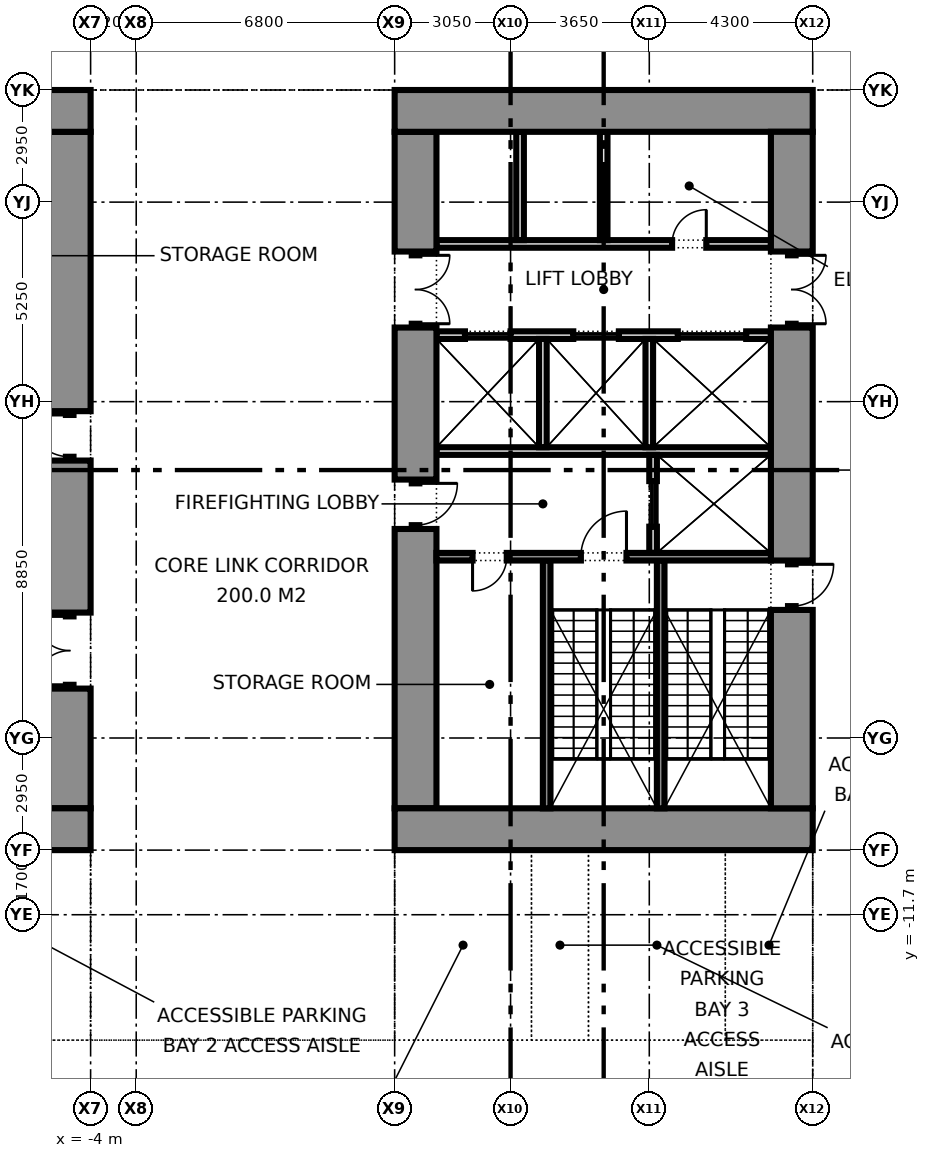
"""IFC4 building model, lengths in metres.
Left out: names, types, materials, properties, quantities, classifications, styles, units other than length and angle.
Written with IfcOpenShell. Run it as: python <this file> out.ifc"""

import sys

from ifc_helpers import new_model, si_unit, direction, frame, frame_2d, origin, place, context, subcontext, project, spatial, rectangle, extrude, element, fill, save


model = new_model("IFC4")
c1 = context("Model", 3, precision=1e-05, world=origin(), true_north=direction((0.0, 1.0)))
c2 = subcontext(c1, "Body", "Model", "MODEL_VIEW")
j1 = project(units=[si_unit("LENGTHUNIT", "METRE"), si_unit("PLANEANGLEUNIT", "RADIAN")], contexts=[c1])
p1 = place(None, origin())
s1 = spatial("IfcSite", under=j1, at=p1, CompositionType="ELEMENT")
p2 = place(p1, origin())
s2 = spatial("IfcBuilding", under=s1, at=p2, CompositionType="ELEMENT")
p3 = place(p2, frame((0.0, 0.0, -5.0)))
s3 = spatial("IfcBuildingStorey", under=s2, at=p3, CompositionType="ELEMENT", Elevation=-5.0)
for number, where, z_axis, x_axis in (
    (1, (-15.0, -9.45, 0.0), (0.0, 0.0, 1.0), (1.0, 0.0, 0.0)),
    (2, (-15.0, 9.45, 0.0), (0.0, 0.0, 1.0), (1.0, 0.0, 0.0)),
):
    element("IfcWall", number, at=place(p3, frame(where, z_axis=z_axis, x_axis=x_axis)), inside=s3, PredefinedType="SHEAR", context=c2, shape_type="SweptSolid", body=[
        extrude(rectangle(XDim=11.0, YDim=1.1, at=frame_2d((5.5, 0.0))), origin(), (0.0, 0.0, 1.0), 4.7),
    ])
p4 = place(p3, frame((-4.55, -8.9, 0.0), z_axis=(0.0, 0.0, 1.0), x_axis=(0.0, 1.0, 0.0)))
e3 = element("IfcWall", 3, at=p4, inside=s3, PredefinedType="SHEAR", context=c2, shape_type="SweptSolid", body=[
    extrude(rectangle(XDim=3.15, YDim=1.1, at=frame_2d((1.575, 0.0))), origin(), (0.0, 0.0, 1.0), 4.7),
])
p5 = place(p3, frame((-4.55, -5.75, 0.0), z_axis=(0.0, 0.0, 1.0), x_axis=(0.0, 1.0, 0.0)))
e4 = element("IfcWall", 4, at=p5, inside=s3, PredefinedType="PARTITIONING", context=c2, shape_type="SweptSolid", body=[
    extrude(rectangle(XDim=2.0, YDim=0.2, at=frame_2d((1.0, 0.0))), origin(), (0.0, 0.0, 1.0), 2.4),
])
p6 = place(p5, frame((0.1, 0.0, 0.0)))
e5 = element("IfcOpeningElement", 5, at=p6, cuts=e4, PredefinedType="OPENING", context=c2, shape_type="SweptSolid", body=[
    extrude(rectangle(XDim=1.8, YDim=2.1, at=frame_2d((0.9, 1.05))), frame((0.0, 0.11, 0.0), z_axis=(0.0, -1.0, 0.0), x_axis=(1.0, 0.0, 0.0)), (0.0, 0.0, 1.0), 0.22),
])
p7 = place(p3, frame((-4.55, -3.75, 0.0), z_axis=(0.0, 0.0, 1.0), x_axis=(0.0, 1.0, 0.0)))
e6 = element("IfcWall", 6, at=p7, inside=s3, PredefinedType="SHEAR", context=c2, shape_type="SweptSolid", body=[
    extrude(rectangle(XDim=4.0, YDim=1.1, at=frame_2d((2.0, 0.0))), origin(), (0.0, 0.0, 1.0), 4.7),
])
p8 = place(p3, frame((-4.55, 0.25, 0.0), z_axis=(0.0, 0.0, 1.0), x_axis=(0.0, 1.0, 0.0)))
e7 = element("IfcWall", 7, at=p8, inside=s3, PredefinedType="PARTITIONING", context=c2, shape_type="SweptSolid", body=[
    extrude(rectangle(XDim=1.3, YDim=0.2, at=frame_2d((0.65, 0.0))), origin(), (0.0, 0.0, 1.0), 2.4),
])
p9 = place(p8, frame((0.1, 0.0, 0.0)))
e8 = element("IfcOpeningElement", 8, at=p9, cuts=e7, PredefinedType="OPENING", context=c2, shape_type="SweptSolid", body=[
    extrude(rectangle(XDim=1.1, YDim=2.1, at=frame_2d((0.55, 1.05))), frame((0.0, 0.11, 0.0), z_axis=(0.0, -1.0, 0.0), x_axis=(1.0, 0.0, 0.0)), (0.0, 0.0, 1.0), 0.22),
])
p10 = place(p3, frame((-4.55, 1.55, 0.0), z_axis=(0.0, 0.0, 1.0), x_axis=(0.0, 1.0, 0.0)))
e9 = element("IfcWall", 9, at=p10, inside=s3, PredefinedType="SHEAR", context=c2, shape_type="SweptSolid", body=[
    extrude(rectangle(XDim=7.35, YDim=1.1, at=frame_2d((3.675, 0.0))), origin(), (0.0, 0.0, 1.0), 4.7),
])
for number, where, z_axis, x_axis in (
    (10, (15.0, 9.45, 0.0), (0.0, 0.0, 1.0), (-1.0, 0.0, 0.0)),
    (11, (15.0, -9.45, 0.0), (0.0, 0.0, 1.0), (-1.0, 0.0, 0.0)),
):
    element("IfcWall", number, at=place(p3, frame(where, z_axis=z_axis, x_axis=x_axis)), inside=s3, PredefinedType="SHEAR", context=c2, shape_type="SweptSolid", body=[
        extrude(rectangle(XDim=11.0, YDim=1.1, at=frame_2d((5.5, 0.0))), origin(), (0.0, 0.0, 1.0), 4.7),
    ])
p11 = place(p3, frame((14.45, 8.9, 0.0), z_axis=(0.0, 0.0, 1.0), x_axis=(0.0, -1.0, 0.0)))
e12 = element("IfcWall", 12, at=p11, inside=s3, PredefinedType="SHEAR", context=c2, shape_type="SweptSolid", body=[
    extrude(rectangle(XDim=3.15, YDim=1.1, at=frame_2d((1.575, 0.0))), origin(), (0.0, 0.0, 1.0), 4.7),
])
p12 = place(p3, frame((14.45, 5.75, 0.0), z_axis=(0.0, 0.0, 1.0), x_axis=(0.0, -1.0, 0.0)))
e13 = element("IfcWall", 13, at=p12, inside=s3, PredefinedType="PARTITIONING", context=c2, shape_type="SweptSolid", body=[
    extrude(rectangle(XDim=2.0, YDim=0.2, at=frame_2d((1.0, 0.0))), origin(), (0.0, 0.0, 1.0), 2.4),
])
p13 = place(p12, frame((0.1, 0.0, 0.0)))
e14 = element("IfcOpeningElement", 14, at=p13, cuts=e13, PredefinedType="OPENING", context=c2, shape_type="SweptSolid", body=[
    extrude(rectangle(XDim=1.8, YDim=2.1, at=frame_2d((0.9, 1.05))), frame((0.0, 0.11, 0.0), z_axis=(0.0, -1.0, 0.0), x_axis=(1.0, 0.0, 0.0)), (0.0, 0.0, 1.0), 0.22),
])
p14 = place(p3, frame((14.45, 3.75, 0.0), z_axis=(0.0, 0.0, 1.0), x_axis=(0.0, -1.0, 0.0)))
e15 = element("IfcWall", 15, at=p14, inside=s3, PredefinedType="SHEAR", context=c2, shape_type="SweptSolid", body=[
    extrude(rectangle(XDim=6.13, YDim=1.1, at=frame_2d((3.065, 0.0))), origin(), (0.0, 0.0, 1.0), 4.7),
])
p15 = place(p3, frame((14.45, -2.38, 0.0), z_axis=(0.0, 0.0, 1.0), x_axis=(0.0, -1.0, 0.0)))
e16 = element("IfcWall", 16, at=p15, inside=s3, PredefinedType="SHEAR", context=c2, shape_type="SweptSolid", body=[
    extrude(rectangle(XDim=1.3, YDim=0.2, at=frame_2d((0.65, 0.0))), origin(), (0.0, 0.0, 1.0), 2.4),
])
p16 = place(p15, frame((0.1, 0.0, 0.0)))
e17 = element("IfcOpeningElement", 17, at=p16, cuts=e16, PredefinedType="OPENING", context=c2, shape_type="SweptSolid", body=[
    extrude(rectangle(XDim=1.1, YDim=2.1, at=frame_2d((0.55, 1.05))), frame((0.0, 0.11, 0.0), z_axis=(0.0, -1.0, 0.0), x_axis=(1.0, 0.0, 0.0)), (0.0, 0.0, 1.0), 0.22),
])
p17 = place(p3, frame((14.45, -3.68, 0.0), z_axis=(0.0, 0.0, 1.0), x_axis=(0.0, -1.0, 0.0)))
e18 = element("IfcWall", 18, at=p17, inside=s3, PredefinedType="SHEAR", context=c2, shape_type="SweptSolid", body=[
    extrude(rectangle(XDim=5.22, YDim=1.1, at=frame_2d((2.61, 0.0))), origin(), (0.0, 0.0, 1.0), 4.7),
])
p18 = place(p3, frame((4.55, 8.9, 0.0), z_axis=(0.0, 0.0, 1.0), x_axis=(0.0, -1.0, 0.0)))
e19 = element("IfcWall", 19, at=p18, inside=s3, PredefinedType="SHEAR", context=c2, shape_type="SweptSolid", body=[
    extrude(rectangle(XDim=3.15, YDim=1.1, at=frame_2d((1.575, 0.0))), origin(), (0.0, 0.0, 1.0), 4.7),
])
p19 = place(p3, frame((4.55, 5.75, 0.0), z_axis=(0.0, 0.0, 1.0), x_axis=(0.0, -1.0, 0.0)))
e20 = element("IfcWall", 20, at=p19, inside=s3, PredefinedType="PARTITIONING", context=c2, shape_type="SweptSolid", body=[
    extrude(rectangle(XDim=2.0, YDim=0.2, at=frame_2d((1.0, 0.0))), origin(), (0.0, 0.0, 1.0), 2.4),
])
p20 = place(p19, frame((0.1, 0.0, 0.0)))
e21 = element("IfcOpeningElement", 21, at=p20, cuts=e20, PredefinedType="OPENING", context=c2, shape_type="SweptSolid", body=[
    extrude(rectangle(XDim=1.8, YDim=2.1, at=frame_2d((0.9, 1.05))), frame((0.0, 0.11, 0.0), z_axis=(0.0, -1.0, 0.0), x_axis=(1.0, 0.0, 0.0)), (0.0, 0.0, 1.0), 0.22),
])
p21 = place(p3, frame((4.55, 3.75, 0.0), z_axis=(0.0, 0.0, 1.0), x_axis=(0.0, -1.0, 0.0)))
e22 = element("IfcWall", 22, at=p21, inside=s3, PredefinedType="SHEAR", context=c2, shape_type="SweptSolid", body=[
    extrude(rectangle(XDim=4.0, YDim=1.1, at=frame_2d((2.0, 0.0))), origin(), (0.0, 0.0, 1.0), 4.7),
])
p22 = place(p3, frame((4.55, -0.25, 0.0), z_axis=(0.0, 0.0, 1.0), x_axis=(0.0, -1.0, 0.0)))
e23 = element("IfcWall", 23, at=p22, inside=s3, PredefinedType="PARTITIONING", context=c2, shape_type="SweptSolid", body=[
    extrude(rectangle(XDim=1.3, YDim=0.2, at=frame_2d((0.65, 0.0))), origin(), (0.0, 0.0, 1.0), 2.4),
])
p23 = place(p22, frame((0.1, 0.0, 0.0)))
e24 = element("IfcOpeningElement", 24, at=p23, cuts=e23, PredefinedType="OPENING", context=c2, shape_type="SweptSolid", body=[
    extrude(rectangle(XDim=1.1, YDim=2.1, at=frame_2d((0.55, 1.05))), frame((0.0, 0.11, 0.0), z_axis=(0.0, -1.0, 0.0), x_axis=(1.0, 0.0, 0.0)), (0.0, 0.0, 1.0), 0.22),
])
p24 = place(p3, frame((4.55, -1.55, 0.0), z_axis=(0.0, 0.0, 1.0), x_axis=(0.0, -1.0, 0.0)))
e25 = element("IfcWall", 25, at=p24, inside=s3, PredefinedType="SHEAR", context=c2, shape_type="SweptSolid", body=[
    extrude(rectangle(XDim=7.35, YDim=1.1, at=frame_2d((3.675, 0.0))), origin(), (0.0, 0.0, 1.0), 4.7),
])
p25 = place(p3, frame((13.9, 5.95, 0.0), z_axis=(0.0, 0.0, 1.0), x_axis=(-1.0, 0.0, 0.0)))
e26 = element("IfcWall", 26, at=p25, inside=s3, PredefinedType="PARTITIONING", context=c2, shape_type="SweptSolid", body=[
    extrude(rectangle(XDim=8.8, YDim=0.2, at=frame_2d((4.4, 0.0))), origin(), (0.0, 0.0, 1.0), 4.7),
])
p26 = place(p25, frame((1.7, 0.0, 0.0)))
e27 = element("IfcOpeningElement", 27, at=p26, cuts=e26, PredefinedType="OPENING", context=c2, shape_type="SweptSolid", body=[
    extrude(rectangle(XDim=0.9, YDim=2.1, at=frame_2d((0.45, 1.05))), frame((0.0, 0.11, 0.0), z_axis=(0.0, -1.0, 0.0), x_axis=(1.0, 0.0, 0.0)), (0.0, 0.0, 1.0), 0.22),
])
p27 = place(p3, frame((13.9, 3.55, 0.0), z_axis=(0.0, 0.0, 1.0), x_axis=(-1.0, 0.0, 0.0)))
e28 = element("IfcWall", 28, at=p27, inside=s3, PredefinedType="PARTITIONING", context=c2, shape_type="SweptSolid", body=[
    extrude(rectangle(XDim=8.8, YDim=0.2, at=frame_2d((4.4, 0.0))), origin(), (0.0, 0.0, 1.0), 4.7),
])
p28 = place(p27, frame((0.65, 0.0, 0.0)))
e29 = element("IfcOpeningElement", 29, at=p28, cuts=e28, PredefinedType="OPENING", context=c2, shape_type="SweptSolid", body=[
    extrude(rectangle(XDim=1.8, YDim=2.1, at=frame_2d((0.9, 1.05))), frame((0.0, 0.11, 0.0), z_axis=(0.0, -1.0, 0.0), x_axis=(1.0, 0.0, 0.0)), (0.0, 0.0, 1.0), 0.22),
])
p29 = place(p27, frame((4.0, 0.0, 0.0)))
e30 = element("IfcOpeningElement", 30, at=p29, cuts=e28, PredefinedType="OPENING", context=c2, shape_type="SweptSolid", body=[
    extrude(rectangle(XDim=1.2, YDim=2.1, at=frame_2d((0.6, 1.05))), frame((0.0, 0.11, 0.0), z_axis=(0.0, -1.0, 0.0), x_axis=(1.0, 0.0, 0.0)), (0.0, 0.0, 1.0), 0.22),
])
p30 = place(p27, frame((6.85, 0.0, 0.0)))
e31 = element("IfcOpeningElement", 31, at=p30, cuts=e28, PredefinedType="OPENING", context=c2, shape_type="SweptSolid", body=[
    extrude(rectangle(XDim=1.2, YDim=2.1, at=frame_2d((0.6, 1.05))), frame((0.0, 0.11, 0.0), z_axis=(0.0, -1.0, 0.0), x_axis=(1.0, 0.0, 0.0)), (0.0, 0.0, 1.0), 0.22),
])
p31 = place(p3, frame((13.9, 0.5, 0.0), z_axis=(0.0, 0.0, 1.0), x_axis=(-1.0, 0.0, 0.0)))
e32 = element("IfcWall", 32, at=p31, inside=s3, PredefinedType="PARTITIONING", context=c2, shape_type="SweptSolid", body=[
    extrude(rectangle(XDim=8.8, YDim=0.2, at=frame_2d((4.4, 0.0))), origin(), (0.0, 0.0, 1.0), 4.7),
])
p32 = place(p3, frame((10.8, 0.4, 0.0), z_axis=(0.0, 0.0, 1.0), x_axis=(0.0, -1.0, 0.0)))
e33 = element("IfcWall", 33, at=p32, inside=s3, PredefinedType="PARTITIONING", context=c2, shape_type="SweptSolid", body=[
    extrude(rectangle(XDim=2.58, YDim=0.2, at=frame_2d((1.29, 0.0))), origin(), (0.0, 0.0, 1.0), 4.7),
])
p33 = place(p32, frame((0.69, 0.0, 0.0)))
e34 = element("IfcOpeningElement", 34, at=p33, cuts=e33, PredefinedType="OPENING", context=c2, shape_type="SweptSolid", body=[
    extrude(rectangle(XDim=1.2, YDim=2.1, at=frame_2d((0.6, 1.05))), frame((0.0, 0.11, 0.0), z_axis=(0.0, -1.0, 0.0), x_axis=(1.0, 0.0, 0.0)), (0.0, 0.0, 1.0), 0.22),
])
p34 = place(p3, frame((13.9, -2.28, 0.0), z_axis=(0.0, 0.0, 1.0), x_axis=(-1.0, 0.0, 0.0)))
e35 = element("IfcWall", 35, at=p34, inside=s3, PredefinedType="SHEAR", context=c2, shape_type="SweptSolid", body=[
    extrude(rectangle(XDim=8.8, YDim=0.2, at=frame_2d((4.4, 0.0))), origin(), (0.0, 0.0, 1.0), 4.7),
])
p35 = place(p34, frame((3.8, 0.0, 0.0)))
e36 = element("IfcOpeningElement", 36, at=p35, cuts=e35, PredefinedType="OPENING", context=c2, shape_type="SweptSolid", body=[
    extrude(rectangle(XDim=1.2, YDim=2.1, at=frame_2d((0.6, 1.05))), frame((0.0, 0.11, 0.0), z_axis=(0.0, -1.0, 0.0), x_axis=(1.0, 0.0, 0.0)), (0.0, 0.0, 1.0), 0.22),
])
p36 = place(p34, frame((6.95, 0.0, 0.0)))
e37 = element("IfcOpeningElement", 37, at=p36, cuts=e35, PredefinedType="OPENING", context=c2, shape_type="SweptSolid", body=[
    extrude(rectangle(XDim=0.9, YDim=2.1, at=frame_2d((0.45, 1.05))), frame((0.0, 0.11, 0.0), z_axis=(0.0, -1.0, 0.0), x_axis=(1.0, 0.0, 0.0)), (0.0, 0.0, 1.0), 0.22),
])
for number, where, z_axis, x_axis in (
    (38, (11.0, -2.38, 0.0), (0.0, 0.0, 1.0), (0.0, -1.0, 0.0)),
    (39, (8.0, -2.38, 0.0), (0.0, 0.0, 1.0), (0.0, -1.0, 0.0)),
):
    element("IfcWall", number, at=place(p3, frame(where, z_axis=z_axis, x_axis=x_axis)), inside=s3, PredefinedType="SHEAR", context=c2, shape_type="SweptSolid", body=[
        extrude(rectangle(XDim=6.52, YDim=0.2, at=frame_2d((3.26, 0.0))), origin(), (0.0, 0.0, 1.0), 4.7),
    ])
for number, where, z_axis, x_axis in (
    (40, (9.5, 8.9, 0.0), (0.0, 0.0, 1.0), (0.0, -1.0, 0.0)),
    (41, (7.3, 8.9, 0.0), (0.0, 0.0, 1.0), (0.0, -1.0, 0.0)),
    (42, (10.7, 3.45, 0.0), (0.0, 0.0, 1.0), (0.0, -1.0, 0.0)),
    (43, (7.9, 3.45, 0.0), (0.0, 0.0, 1.0), (0.0, -1.0, 0.0)),
):
    element("IfcWall", number, at=place(p3, frame(where, z_axis=z_axis, x_axis=x_axis)), inside=s3, PredefinedType="PARTITIONING", context=c2, shape_type="SweptSolid", body=[
        extrude(rectangle(XDim=2.85, YDim=0.2, at=frame_2d((1.425, 0.0))), origin(), (0.0, 0.0, 1.0), 4.7),
    ])
p37 = place(p6, origin())
e44 = element("IfcDoor", 44, at=p37, inside=s3, OperationType="DOUBLE_DOOR_SINGLE_SWING", PredefinedType="DOOR", context=c2, shape_type="SweptSolid", body=[
    extrude(rectangle(XDim=1.8, YDim=2.1, at=frame_2d((0.9, 1.05))), frame((0.0, 0.025, 0.0), z_axis=(0.0, -1.0, 0.0), x_axis=(1.0, 0.0, 0.0)), (0.0, 0.0, 1.0), 0.05),
])
fill(e5, e44)
p38 = place(p9, origin())
e45 = element("IfcDoor", 45, at=p38, inside=s3, OperationType="SINGLE_SWING_RIGHT", PredefinedType="DOOR", context=c2, shape_type="SweptSolid", body=[
    extrude(rectangle(XDim=1.1, YDim=2.1, at=frame_2d((0.55, 1.05))), frame((0.0, 0.025, 0.0), z_axis=(0.0, -1.0, 0.0), x_axis=(1.0, 0.0, 0.0)), (0.0, 0.0, 1.0), 0.05),
])
fill(e8, e45)
p39 = place(p13, origin())
e46 = element("IfcDoor", 46, at=p39, inside=s3, OperationType="DOUBLE_DOOR_SINGLE_SWING", PredefinedType="DOOR", context=c2, shape_type="SweptSolid", body=[
    extrude(rectangle(XDim=1.8, YDim=2.1, at=frame_2d((0.9, 1.05))), frame((0.0, 0.025, 0.0), z_axis=(0.0, -1.0, 0.0), x_axis=(1.0, 0.0, 0.0)), (0.0, 0.0, 1.0), 0.05),
])
fill(e14, e46)
p40 = place(p16, origin())
e47 = element("IfcDoor", 47, at=p40, inside=s3, OperationType="SINGLE_SWING_LEFT", PredefinedType="DOOR", context=c2, shape_type="SweptSolid", body=[
    extrude(rectangle(XDim=1.1, YDim=2.1, at=frame_2d((0.55, 1.05))), frame((0.0, 0.025, 0.0), z_axis=(0.0, -1.0, 0.0), x_axis=(1.0, 0.0, 0.0)), (0.0, 0.0, 1.0), 0.05),
])
fill(e17, e47)
p41 = place(p20, origin())
e48 = element("IfcDoor", 48, at=p41, inside=s3, OperationType="DOUBLE_DOOR_SINGLE_SWING", PredefinedType="DOOR", context=c2, shape_type="SweptSolid", body=[
    extrude(rectangle(XDim=1.8, YDim=2.1, at=frame_2d((0.9, 1.05))), frame((0.0, 0.025, 0.0), z_axis=(0.0, -1.0, 0.0), x_axis=(1.0, 0.0, 0.0)), (0.0, 0.0, 1.0), 0.05),
])
fill(e21, e48)
p42 = place(p23, origin())
e49 = element("IfcDoor", 49, at=p42, inside=s3, OperationType="SINGLE_SWING_LEFT", PredefinedType="DOOR", context=c2, shape_type="SweptSolid", body=[
    extrude(rectangle(XDim=1.1, YDim=2.1, at=frame_2d((0.55, 1.05))), frame((0.0, 0.025, 0.0), z_axis=(0.0, -1.0, 0.0), x_axis=(1.0, 0.0, 0.0)), (0.0, 0.0, 1.0), 0.05),
])
fill(e24, e49)
p43 = place(p28, origin())
e50 = element("IfcDoor", 50, at=p43, inside=s3, OperationType="DOUBLE_DOOR_SLIDING", PredefinedType="DOOR", context=c2, shape_type="SweptSolid", body=[
    extrude(rectangle(XDim=1.8, YDim=2.1, at=frame_2d((0.9, 1.05))), frame((0.0, 0.025, 0.0), z_axis=(0.0, -1.0, 0.0), x_axis=(1.0, 0.0, 0.0)), (0.0, 0.0, 1.0), 0.05),
])
fill(e29, e50)
p44 = place(p29, origin())
e51 = element("IfcDoor", 51, at=p44, inside=s3, OperationType="DOUBLE_DOOR_SLIDING", PredefinedType="DOOR", context=c2, shape_type="SweptSolid", body=[
    extrude(rectangle(XDim=1.2, YDim=2.1, at=frame_2d((0.6, 1.05))), frame((0.0, 0.025, 0.0), z_axis=(0.0, -1.0, 0.0), x_axis=(1.0, 0.0, 0.0)), (0.0, 0.0, 1.0), 0.05),
])
fill(e30, e51)
p45 = place(p30, origin())
e52 = element("IfcDoor", 52, at=p45, inside=s3, OperationType="DOUBLE_DOOR_SLIDING", PredefinedType="DOOR", context=c2, shape_type="SweptSolid", body=[
    extrude(rectangle(XDim=1.2, YDim=2.1, at=frame_2d((0.6, 1.05))), frame((0.0, 0.025, 0.0), z_axis=(0.0, -1.0, 0.0), x_axis=(1.0, 0.0, 0.0)), (0.0, 0.0, 1.0), 0.05),
])
fill(e31, e52)
p46 = place(p33, origin())
e53 = element("IfcDoor", 53, at=p46, inside=s3, OperationType="DOUBLE_DOOR_SLIDING", PredefinedType="DOOR", context=c2, shape_type="SweptSolid", body=[
    extrude(rectangle(XDim=1.2, YDim=2.1, at=frame_2d((0.6, 1.05))), frame((0.0, 0.025, 0.0), z_axis=(0.0, -1.0, 0.0), x_axis=(1.0, 0.0, 0.0)), (0.0, 0.0, 1.0), 0.05),
])
fill(e34, e53)
p47 = place(p26, frame((0.9, 0.0, 0.0), z_axis=(0.0, 0.0, 1.0), x_axis=(-1.0, 0.0, 0.0)))
e54 = element("IfcDoor", 54, at=p47, inside=s3, OperationType="SINGLE_SWING_RIGHT", PredefinedType="DOOR", context=c2, shape_type="SweptSolid", body=[
    extrude(rectangle(XDim=0.9, YDim=2.1, at=frame_2d((0.45, 1.05))), frame((0.0, 0.025, 0.0), z_axis=(0.0, -1.0, 0.0), x_axis=(1.0, 0.0, 0.0)), (0.0, 0.0, 1.0), 0.05),
])
fill(e27, e54)
p48 = place(p35, frame((1.2, 0.0, 0.0), z_axis=(0.0, 0.0, 1.0), x_axis=(-1.0, 0.0, 0.0)))
e55 = element("IfcDoor", 55, at=p48, inside=s3, OperationType="SINGLE_SWING_RIGHT", PredefinedType="DOOR", context=c2, shape_type="SweptSolid", body=[
    extrude(rectangle(XDim=1.2, YDim=2.1, at=frame_2d((0.6, 1.05))), frame((0.0, 0.025, 0.0), z_axis=(0.0, -1.0, 0.0), x_axis=(1.0, 0.0, 0.0)), (0.0, 0.0, 1.0), 0.05),
])
fill(e36, e55)
p49 = place(p36, origin())
e56 = element("IfcDoor", 56, at=p49, inside=s3, OperationType="SINGLE_SWING_RIGHT", PredefinedType="DOOR", context=c2, shape_type="SweptSolid", body=[
    extrude(rectangle(XDim=0.9, YDim=2.1, at=frame_2d((0.45, 1.05))), frame((0.0, 0.025, 0.0), z_axis=(0.0, -1.0, 0.0), x_axis=(1.0, 0.0, 0.0)), (0.0, 0.0, 1.0), 0.05),
])
fill(e37, e56)
save(model, sys.argv[1])
